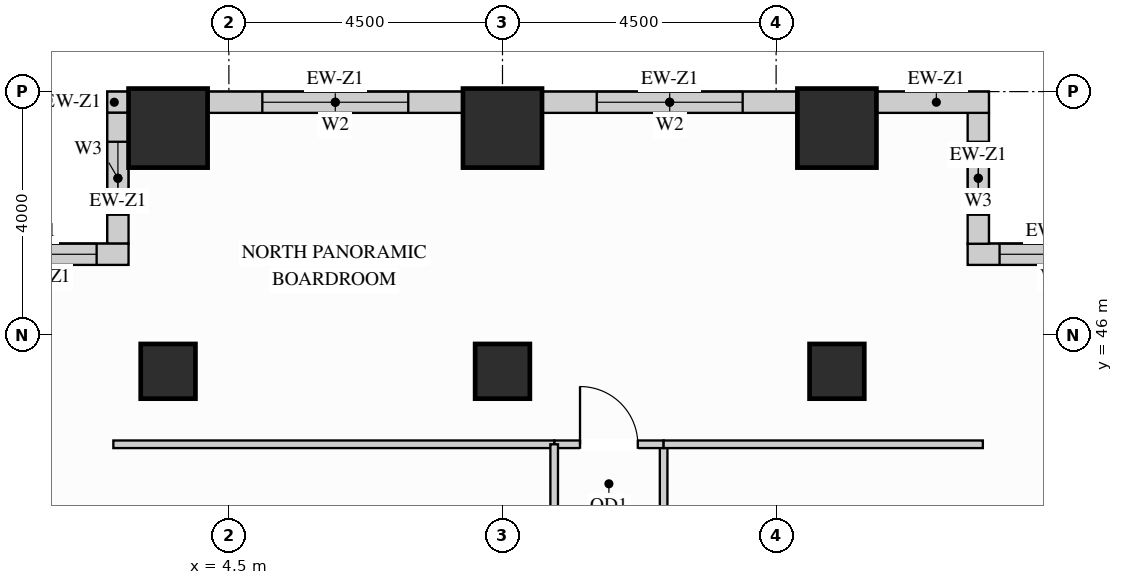
"""IFC4 building model, lengths in metres.
Left out: names, types, materials, properties, quantities, classifications, styles, units other than length and angle.
Written with IfcOpenShell. Run it as: python <this file> out.ifc"""

import sys

from ifc_helpers import new_model, si_unit, direction, frame, frame_2d, origin, origin_2d, place, context, subcontext, project, spatial, rectangle, extrude, source, transform, mapped, element, fill, save


model = new_model("IFC4")
c1 = context("Model", 3, precision=1e-05, world=origin(), true_north=direction((0.0, 1.0)))
c2 = subcontext(c1, "Body", "Model", "MODEL_VIEW")
j1 = project(units=[si_unit("LENGTHUNIT", "METRE"), si_unit("PLANEANGLEUNIT", "RADIAN")], contexts=[c1])
p1 = place(None, origin())
s1 = spatial("IfcSite", under=j1, at=p1, CompositionType="ELEMENT")
p2 = place(p1, origin())
s2 = spatial("IfcBuilding", under=s1, at=p2, CompositionType="ELEMENT")
p3 = place(p2, frame((0.0, 0.0, 33.3)))
s3 = spatial("IfcBuildingStorey", under=s2, at=p3, CompositionType="ELEMENT", Elevation=33.3)
m1 = source(origin(), c2, "Body", "SweptSolid", [
    extrude(rectangle(XDim=0.9, YDim=0.9, at=origin_2d()), origin(), (0.0, 0.0, 1.0), 3.38),
])
for number, where, z_axis, x_axis in (
    (1, (14.5, 45.4, 0.0), (0.0, 0.0, 1.0), (1.0, 0.0, 0.0)),
    (2, (3.5, 45.4, 0.0), (0.0, 0.0, 1.0), (1.0, 0.0, 0.0)),
    (3, (9.0, 45.4, 0.0), (0.0, 0.0, 1.0), (1.0, 0.0, 0.0)),
):
    element("IfcColumn", number, at=place(p3, frame(where, z_axis=z_axis, x_axis=x_axis)), inside=s3, PredefinedType="COLUMN", context=c2, shape_type="MappedRepresentation", body=[
        mapped(m1, transform((0.0, 0.0, 0.0), x_axis=(1.0, 0.0, 0.0), y_axis=(0.0, 1.0, 0.0), z_axis=(0.0, 0.0, 1.0))),
    ])
m2 = source(origin(), c2, "Body", "SweptSolid", [
    extrude(rectangle(XDim=1.3, YDim=1.3, at=origin_2d()), origin(), (0.0, 0.0, 1.0), 3.38),
])
for number, where, z_axis, x_axis in (
    (4, (14.5, 49.4, 0.0), (0.0, 0.0, 1.0), (1.0, 0.0, 0.0)),
    (5, (3.5, 49.4, 0.0), (0.0, 0.0, 1.0), (1.0, 0.0, 0.0)),
    (6, (9.0, 49.4, 0.0), (0.0, 0.0, 1.0), (1.0, 0.0, 0.0)),
):
    element("IfcColumn", number, at=place(p3, frame(where, z_axis=z_axis, x_axis=x_axis)), inside=s3, PredefinedType="COLUMN", context=c2, shape_type="MappedRepresentation", body=[
        mapped(m2, transform((0.0, 0.0, 0.0), x_axis=(1.0, 0.0, 0.0), y_axis=(0.0, 1.0, 0.0), z_axis=(0.0, 0.0, 1.0))),
    ])
p4 = place(p3, frame((19.5, 47.325, 0.0), z_axis=(0.0, 0.0, 1.0), x_axis=(-1.0, 0.0, 0.0)))
e7 = element("IfcWall", 7, at=p4, inside=s3, PredefinedType="SOLIDWALL", context=c2, shape_type="SweptSolid", body=[
    extrude(rectangle(XDim=2.85, YDim=0.35, at=frame_2d((1.425, 0.0))), origin(), (0.0, 0.0, 1.0), 3.365),
])
p5 = place(p4, frame((0.525, 0.0, 0.78)))
e8 = element("IfcOpeningElement", 8, at=p5, cuts=e7, PredefinedType="OPENING", context=c2, shape_type="SweptSolid", body=[
    extrude(rectangle(XDim=1.8, YDim=2.1, at=frame_2d((0.9, 1.05))), frame((0.0, 0.185, 0.0), z_axis=(0.0, -1.0, 0.0), x_axis=(1.0, 0.0, 0.0)), (0.0, 0.0, 1.0), 0.37),
])
p6 = place(p3, frame((16.825, 47.498, 0.0), z_axis=(0.0, 0.0, 1.0), x_axis=(0.0, 1.0, 0.0)))
e9 = element("IfcWall", 9, at=p6, inside=s3, PredefinedType="SOLIDWALL", context=c2, shape_type="SweptSolid", body=[
    extrude(rectangle(XDim=2.154, YDim=0.35, at=frame_2d((1.077, 0.0))), origin(), (0.0, 0.0, 1.0), 3.365),
])
p7 = place(p6, frame((0.477, 0.0, 0.78)))
e10 = element("IfcOpeningElement", 10, at=p7, cuts=e9, PredefinedType="OPENING", context=c2, shape_type="SweptSolid", body=[
    extrude(rectangle(XDim=1.2, YDim=2.1, at=frame_2d((0.6, 1.05))), frame((0.0, 0.185, 0.0), z_axis=(0.0, -1.0, 0.0), x_axis=(1.0, 0.0, 0.0)), (0.0, 0.0, 1.0), 0.37),
])
m3 = source(origin(), c2, "Body", "SweptSolid", [
    extrude(rectangle(XDim=1.852, YDim=0.35, at=frame_2d((0.926, 0.0))), origin(), (0.0, 0.0, 1.0), 3.365),
])
p8 = place(p3, frame((17.0, 49.825, 0.0), z_axis=(0.0, 0.0, 1.0), x_axis=(-1.0, 0.0, 0.0)))
e11 = element("IfcWall", 11, at=p8, inside=s3, PredefinedType="SOLIDWALL", context=c2, shape_type="MappedRepresentation", body=[
    mapped(m3, transform((0.0, 0.0, 0.0), x_axis=(1.0, 0.0, 0.0), y_axis=(0.0, 1.0, 0.0), z_axis=(0.0, 0.0, 1.0))),
])
p9 = place(p3, frame((13.852, 49.825, 0.0), z_axis=(0.0, 0.0, 1.0), x_axis=(-1.0, 0.0, 0.0)))
e12 = element("IfcWall", 12, at=p9, inside=s3, PredefinedType="SOLIDWALL", context=c2, shape_type="SweptSolid", body=[
    extrude(rectangle(XDim=4.204, YDim=0.35, at=frame_2d((2.102, 0.0))), origin(), (0.0, 0.0, 1.0), 2.51),
])
p10 = place(p9, frame((0.902, 0.0, 0.78)))
e13 = element("IfcOpeningElement", 13, at=p10, cuts=e12, PredefinedType="OPENING", context=c2, shape_type="SweptSolid", body=[
    extrude(rectangle(XDim=2.4, YDim=1.55, at=frame_2d((1.2, 0.775))), frame((0.0, 0.185, 0.0), z_axis=(0.0, -1.0, 0.0), x_axis=(1.0, 0.0, 0.0)), (0.0, 0.0, 1.0), 0.37),
])
p11 = place(p3, frame((8.352, 49.825, 0.0), z_axis=(0.0, 0.0, 1.0), x_axis=(-1.0, 0.0, 0.0)))
e14 = element("IfcWall", 14, at=p11, inside=s3, PredefinedType="SOLIDWALL", context=c2, shape_type="SweptSolid", body=[
    extrude(rectangle(XDim=4.204, YDim=0.35, at=frame_2d((2.102, 0.0))), origin(), (0.0, 0.0, 1.0), 2.51),
])
p12 = place(p11, frame((0.902, 0.0, 0.78)))
e15 = element("IfcOpeningElement", 15, at=p12, cuts=e14, PredefinedType="OPENING", context=c2, shape_type="SweptSolid", body=[
    extrude(rectangle(XDim=2.4, YDim=1.55, at=frame_2d((1.2, 0.775))), frame((0.0, 0.185, 0.0), z_axis=(0.0, -1.0, 0.0), x_axis=(1.0, 0.0, 0.0)), (0.0, 0.0, 1.0), 0.37),
])
m4 = source(origin(), c2, "Body", "SweptSolid", [
    extrude(rectangle(XDim=0.352, YDim=0.35, at=frame_2d((0.176, 0.0))), origin(), (0.0, 0.0, 1.0), 3.365),
])
p13 = place(p3, frame((2.852, 49.825, 0.0), z_axis=(0.0, 0.0, 1.0), x_axis=(-1.0, 0.0, 0.0)))
e16 = element("IfcWall", 16, at=p13, inside=s3, PredefinedType="SOLIDWALL", context=c2, shape_type="MappedRepresentation", body=[
    mapped(m4, transform((0.0, 0.0, 0.0), x_axis=(1.0, 0.0, 0.0), y_axis=(0.0, 1.0, 0.0), z_axis=(0.0, 0.0, 1.0))),
])
p14 = place(p3, frame((2.675, 49.652, 0.0), z_axis=(0.0, 0.0, 1.0), x_axis=(0.0, -1.0, 0.0)))
e17 = element("IfcWall", 17, at=p14, inside=s3, PredefinedType="SOLIDWALL", context=c2, shape_type="SweptSolid", body=[
    extrude(rectangle(XDim=2.154, YDim=0.35, at=frame_2d((1.077, 0.0))), origin(), (0.0, 0.0, 1.0), 3.365),
])
p15 = place(p14, frame((0.477, 0.0, 0.78)))
e18 = element("IfcOpeningElement", 18, at=p15, cuts=e17, PredefinedType="OPENING", context=c2, shape_type="SweptSolid", body=[
    extrude(rectangle(XDim=1.2, YDim=2.1, at=frame_2d((0.6, 1.05))), frame((0.0, 0.185, 0.0), z_axis=(0.0, -1.0, 0.0), x_axis=(1.0, 0.0, 0.0)), (0.0, 0.0, 1.0), 0.37),
])
p16 = place(p3, frame((2.85, 47.325, 0.0), z_axis=(0.0, 0.0, 1.0), x_axis=(-1.0, 0.0, 0.0)))
e19 = element("IfcWall", 19, at=p16, inside=s3, PredefinedType="SOLIDWALL", context=c2, shape_type="SweptSolid", body=[
    extrude(rectangle(XDim=2.85, YDim=0.35, at=frame_2d((1.425, 0.0))), origin(), (0.0, 0.0, 1.0), 3.365),
])
p17 = place(p16, frame((0.525, 0.0, 0.78)))
e20 = element("IfcOpeningElement", 20, at=p17, cuts=e19, PredefinedType="OPENING", context=c2, shape_type="SweptSolid", body=[
    extrude(rectangle(XDim=1.8, YDim=2.1, at=frame_2d((0.9, 1.05))), frame((0.0, 0.185, 0.0), z_axis=(0.0, -1.0, 0.0), x_axis=(1.0, 0.0, 0.0)), (0.0, 0.0, 1.0), 0.37),
])
p18 = place(p3, frame((11.65, 38.287, 0.0), z_axis=(0.0, 0.0, 1.0), x_axis=(0.0, 1.0, 0.0)))
e21 = element("IfcWall", 21, at=p18, inside=s3, PredefinedType="PARTITIONING", context=c2, shape_type="SweptSolid", body=[
    extrude(rectangle(XDim=5.913, YDim=0.125, at=frame_2d((2.957, 0.0))), origin(), (0.0, 0.0, 1.0), 3.365),
])
p19 = place(p18, frame((2.481, 0.0, 0.0)))
e22 = element("IfcOpeningElement", 22, at=p19, cuts=e21, PredefinedType="OPENING", context=c2, shape_type="SweptSolid", body=[
    extrude(rectangle(XDim=0.95, YDim=2.15, at=frame_2d((0.475, 1.075))), frame((0.0, 0.073, 0.0), z_axis=(0.0, -1.0, 0.0), x_axis=(1.0, 0.0, 0.0)), (0.0, 0.0, 1.0), 0.145),
])
p20 = place(p3, frame((9.85, 44.2, 0.0), z_axis=(0.0, 0.0, 1.0), x_axis=(1.0, 0.0, 0.0)))
e23 = element("IfcWall", 23, at=p20, inside=s3, PredefinedType="PARTITIONING", context=c2, shape_type="SweptSolid", body=[
    extrude(rectangle(XDim=1.8, YDim=0.125, at=frame_2d((0.9, 0.0))), origin(), (0.0, 0.0, 1.0), 3.365),
])
p21 = place(p20, frame((0.425, 0.0, 0.0)))
e24 = element("IfcOpeningElement", 24, at=p21, cuts=e23, PredefinedType="OPENING", context=c2, shape_type="SweptSolid", body=[
    extrude(rectangle(XDim=0.95, YDim=2.15, at=frame_2d((0.475, 1.075))), frame((0.0, 0.073, 0.0), z_axis=(0.0, -1.0, 0.0), x_axis=(1.0, 0.0, 0.0)), (0.0, 0.0, 1.0), 0.145),
])
m5 = source(origin(), c2, "Body", "SweptSolid", [
    extrude(rectangle(XDim=5.25, YDim=0.125, at=frame_2d((2.625, 0.0))), origin(), (0.0, 0.0, 1.0), 3.365),
])
p22 = place(p3, frame((11.65, 44.2, 0.0), z_axis=(0.0, 0.0, 1.0), x_axis=(1.0, 0.0, 0.0)))
e25 = element("IfcWall", 25, at=p22, inside=s3, PredefinedType="PARTITIONING", context=c2, shape_type="MappedRepresentation", body=[
    mapped(m5, transform((0.0, 0.0, 0.0), x_axis=(1.0, 0.0, 0.0), y_axis=(0.0, 1.0, 0.0), z_axis=(0.0, 0.0, 1.0))),
])
m6 = source(origin(), c2, "Body", "SweptSolid", [
    extrude(rectangle(XDim=7.25, YDim=0.125, at=frame_2d((3.625, 0.0))), origin(), (0.0, 0.0, 1.0), 3.365),
])
p23 = place(p3, frame((2.6, 44.2, 0.0), z_axis=(0.0, 0.0, 1.0), x_axis=(1.0, 0.0, 0.0)))
e26 = element("IfcWall", 26, at=p23, inside=s3, PredefinedType="PARTITIONING", context=c2, shape_type="MappedRepresentation", body=[
    mapped(m6, transform((0.0, 0.0, 0.0), x_axis=(1.0, 0.0, 0.0), y_axis=(0.0, 1.0, 0.0), z_axis=(0.0, 0.0, 1.0))),
])
p24 = place(p3, frame((9.85, 33.25, 0.0), z_axis=(0.0, 0.0, 1.0), x_axis=(0.0, 1.0, 0.0)))
e27 = element("IfcWall", 27, at=p24, inside=s3, PredefinedType="PARTITIONING", context=c2, shape_type="SweptSolid", body=[
    extrude(rectangle(XDim=10.95, YDim=0.125, at=frame_2d((5.475, 0.0))), origin(), (0.0, 0.0, 1.0), 3.365),
])
p25 = place(p24, frame((5.803, 0.0, 0.0)))
e28 = element("IfcOpeningElement", 28, at=p25, cuts=e27, PredefinedType="OPENING", context=c2, shape_type="SweptSolid", body=[
    extrude(rectangle(XDim=0.95, YDim=2.15, at=frame_2d((0.475, 1.075))), frame((0.0, 0.073, 0.0), z_axis=(0.0, -1.0, 0.0), x_axis=(1.0, 0.0, 0.0)), (0.0, 0.0, 1.0), 0.145),
])
m7 = source(origin(), c2, "Body", "SweptSolid", [
    extrude(rectangle(XDim=0.95, YDim=2.15, at=frame_2d((0.475, 1.075))), frame((0.0, 0.025, 0.0), z_axis=(0.0, -1.0, 0.0), x_axis=(1.0, 0.0, 0.0)), (0.0, 0.0, 1.0), 0.05),
])
p26 = place(p21, origin())
e29 = element("IfcDoor", 29, at=p26, inside=s3, OperationType="SINGLE_SWING_LEFT", PredefinedType="DOOR", context=c2, shape_type="MappedRepresentation", body=[
    mapped(m7, transform((0.0, 0.0, 0.0), x_axis=(1.0, 0.0, 0.0), y_axis=(0.0, 1.0, 0.0), z_axis=(0.0, 0.0, 1.0))),
])
fill(e24, e29)
m8 = source(origin(), c2, "Body", "SweptSolid", [
    extrude(rectangle(XDim=1.8, YDim=2.1, at=frame_2d((0.9, 1.05))), frame((0.0, 0.03, 0.0), z_axis=(0.0, -1.0, 0.0), x_axis=(1.0, 0.0, 0.0)), (0.0, 0.0, 1.0), 0.06),
])
p27 = place(p5, origin())
e30 = element("IfcWindow", 30, at=p27, inside=s3, PartitioningType="SINGLE_PANEL", PredefinedType="WINDOW", context=c2, shape_type="MappedRepresentation", body=[
    mapped(m8, transform((0.0, 0.0, 0.0), x_axis=(1.0, 0.0, 0.0), y_axis=(0.0, 1.0, 0.0), z_axis=(0.0, 0.0, 1.0))),
])
fill(e8, e30)
p28 = place(p17, origin())
e31 = element("IfcWindow", 31, at=p28, inside=s3, PartitioningType="SINGLE_PANEL", PredefinedType="WINDOW", context=c2, shape_type="MappedRepresentation", body=[
    mapped(m8, transform((0.0, 0.0, 0.0), x_axis=(1.0, 0.0, 0.0), y_axis=(0.0, 1.0, 0.0), z_axis=(0.0, 0.0, 1.0))),
])
fill(e20, e31)
m9 = source(origin(), c2, "Body", "SweptSolid", [
    extrude(rectangle(XDim=2.4, YDim=1.55, at=frame_2d((1.2, 0.775))), frame((0.0, 0.03, 0.0), z_axis=(0.0, -1.0, 0.0), x_axis=(1.0, 0.0, 0.0)), (0.0, 0.0, 1.0), 0.06),
])
p29 = place(p10, origin())
e32 = element("IfcWindow", 32, at=p29, inside=s3, PartitioningType="SINGLE_PANEL", PredefinedType="WINDOW", context=c2, shape_type="MappedRepresentation", body=[
    mapped(m9, transform((0.0, 0.0, 0.0), x_axis=(1.0, 0.0, 0.0), y_axis=(0.0, 1.0, 0.0), z_axis=(0.0, 0.0, 1.0))),
])
fill(e13, e32)
p30 = place(p12, origin())
e33 = element("IfcWindow", 33, at=p30, inside=s3, PartitioningType="SINGLE_PANEL", PredefinedType="WINDOW", context=c2, shape_type="MappedRepresentation", body=[
    mapped(m9, transform((0.0, 0.0, 0.0), x_axis=(1.0, 0.0, 0.0), y_axis=(0.0, 1.0, 0.0), z_axis=(0.0, 0.0, 1.0))),
])
fill(e15, e33)
m10 = source(origin(), c2, "Body", "SweptSolid", [
    extrude(rectangle(XDim=1.2, YDim=2.1, at=frame_2d((0.6, 1.05))), frame((0.0, 0.03, 0.0), z_axis=(0.0, -1.0, 0.0), x_axis=(1.0, 0.0, 0.0)), (0.0, 0.0, 1.0), 0.06),
])
p31 = place(p7, origin())
e34 = element("IfcWindow", 34, at=p31, inside=s3, PartitioningType="SINGLE_PANEL", PredefinedType="WINDOW", context=c2, shape_type="MappedRepresentation", body=[
    mapped(m10, transform((0.0, 0.0, 0.0), x_axis=(1.0, 0.0, 0.0), y_axis=(0.0, 1.0, 0.0), z_axis=(0.0, 0.0, 1.0))),
])
fill(e10, e34)
p32 = place(p15, origin())
e35 = element("IfcWindow", 35, at=p32, inside=s3, PartitioningType="SINGLE_PANEL", PredefinedType="WINDOW", context=c2, shape_type="MappedRepresentation", body=[
    mapped(m10, transform((0.0, 0.0, 0.0), x_axis=(1.0, 0.0, 0.0), y_axis=(0.0, 1.0, 0.0), z_axis=(0.0, 0.0, 1.0))),
])
fill(e18, e35)
save(model, sys.argv[1])
